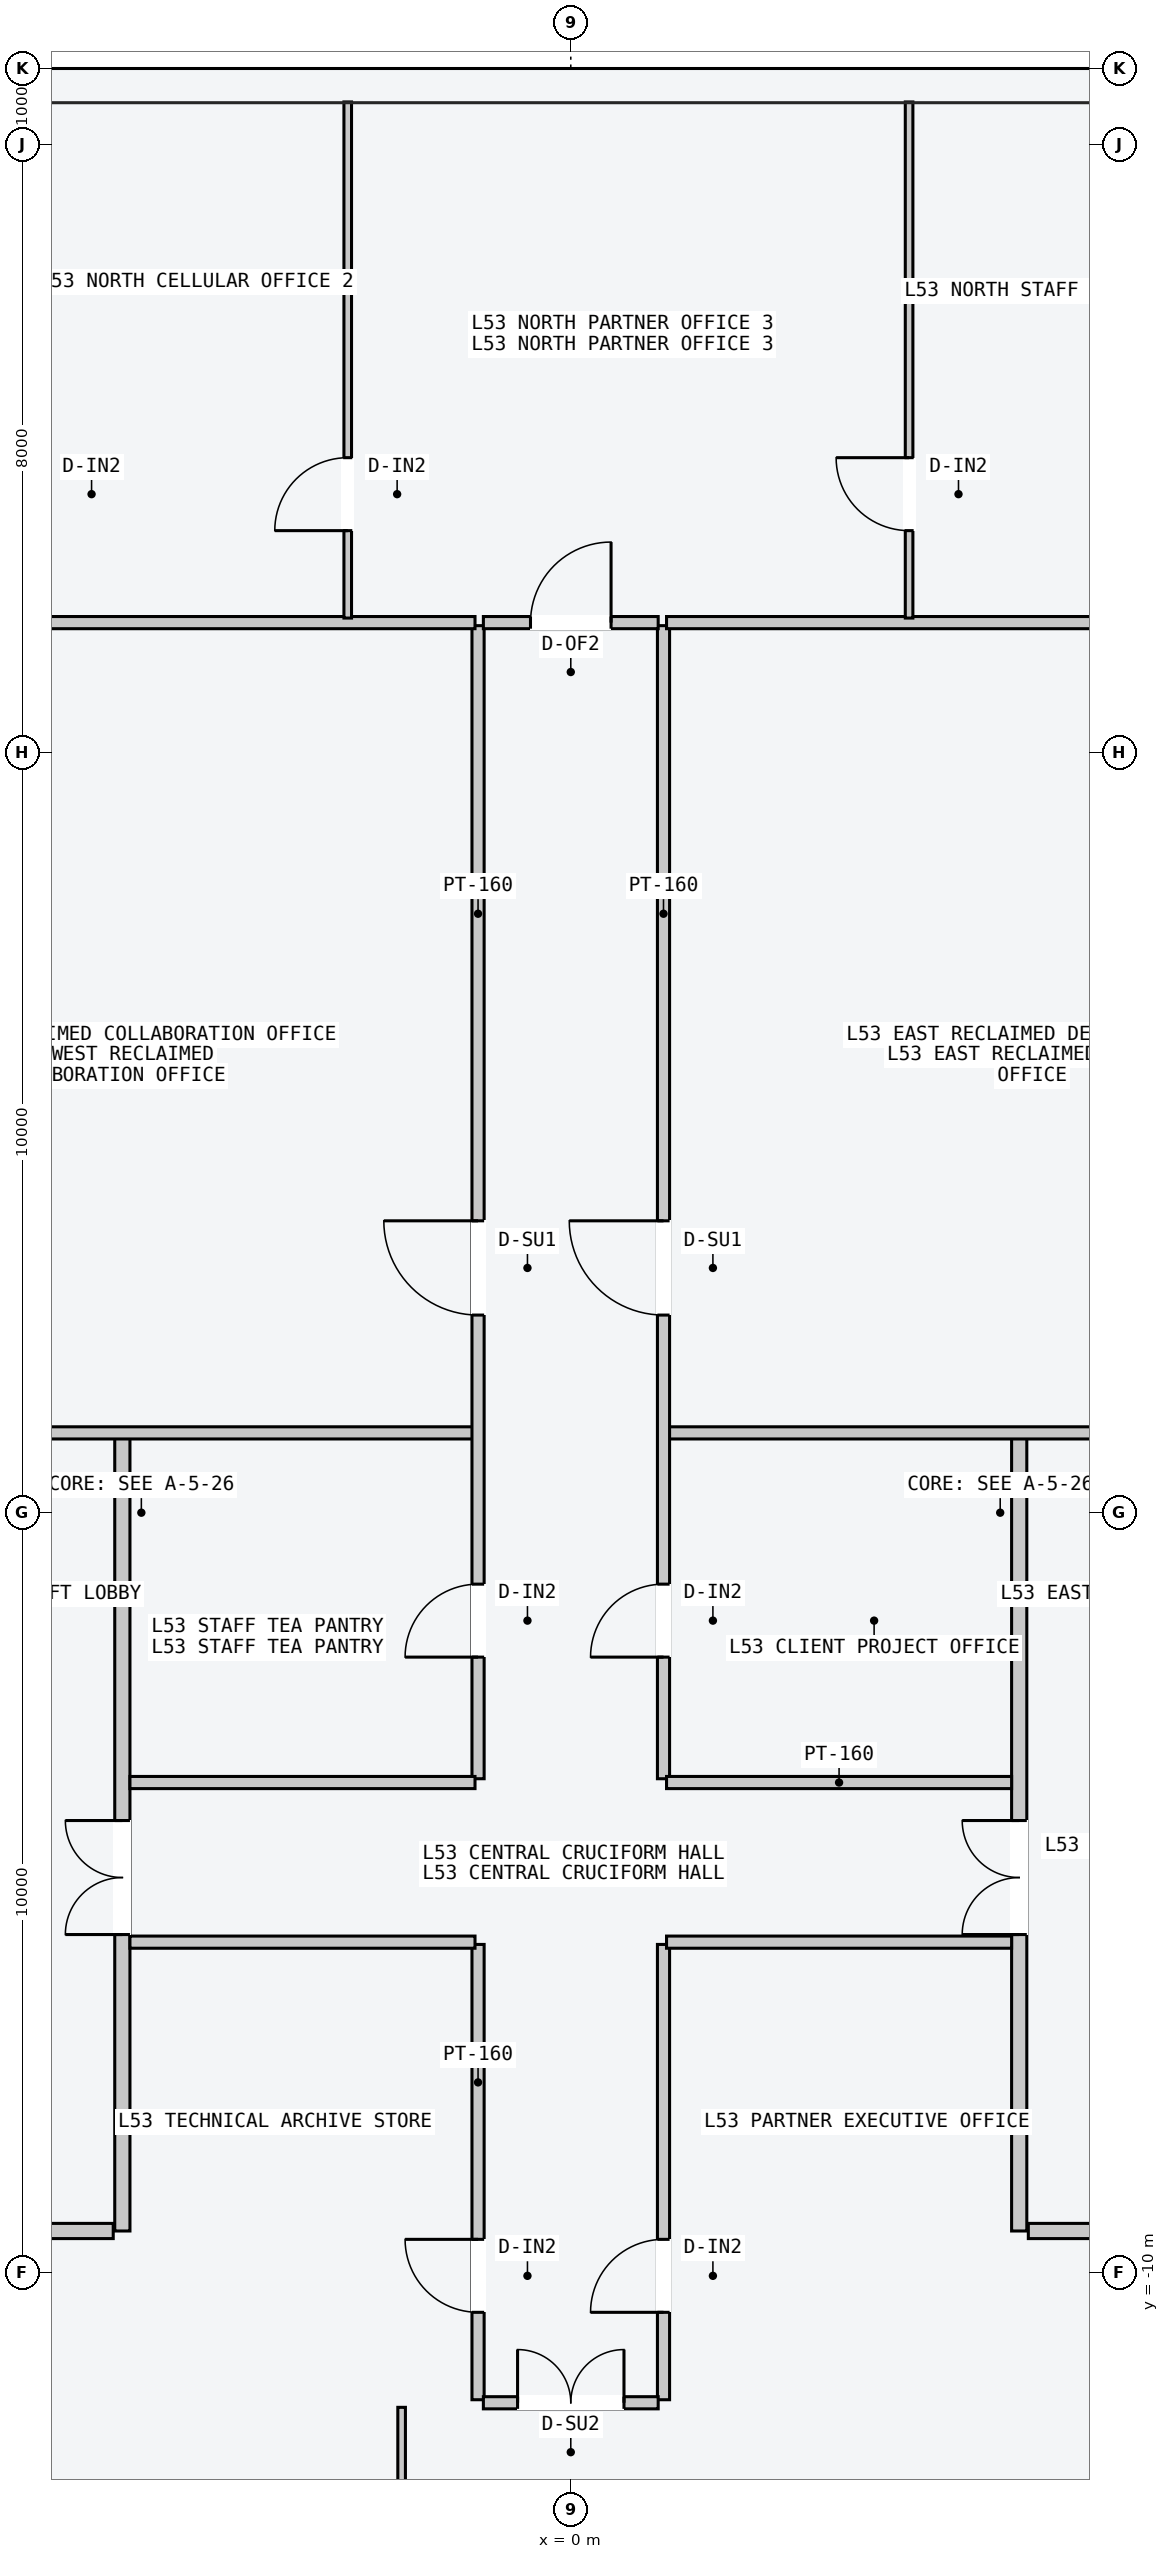
"""IFC4 building model, lengths in metres.
Left out: names, types, materials, properties, quantities, classifications, styles, units other than length and angle.
Written with IfcOpenShell. Run it as: python <this file> out.ifc"""

import sys

from ifc_helpers import new_model, si_unit, direction, frame, frame_2d, origin, place, context, subcontext, project, spatial, rectangle, extrude, element, fill, save


model = new_model("IFC4")
c1 = context("Model", 3, precision=1e-05, world=origin(), true_north=direction((0.0, 1.0)))
c2 = subcontext(c1, "Body", "Model", "MODEL_VIEW")
j1 = project(units=[si_unit("LENGTHUNIT", "METRE"), si_unit("PLANEANGLEUNIT", "RADIAN")], contexts=[c1])
p1 = place(None, origin())
s1 = spatial("IfcSite", under=j1, at=p1, CompositionType="ELEMENT")
p2 = place(p1, origin())
s2 = spatial("IfcBuilding", under=s1, at=p2, CompositionType="ELEMENT")
p3 = place(p2, frame((0.0, 0.0, 201.9)))
s3 = spatial("IfcBuildingStorey", under=s2, at=p3, CompositionType="ELEMENT", Elevation=201.9)
p4 = place(p3, frame((-5.9, -9.45, 0.0), z_axis=(0.0, 0.0, 1.0), x_axis=(0.0, 1.0, 0.0)))
e1 = element("IfcWall", 1, at=p4, inside=s3, PredefinedType="PARTITIONING", context=c2, shape_type="SweptSolid", body=[
    extrude(rectangle(XDim=10.5, YDim=0.2, at=frame_2d((5.25, 0.0))), origin(), (0.0, 0.0, 1.0), 3.4),
])
p5 = place(p4, frame((3.9, 0.0, 0.0)))
e2 = element("IfcOpeningElement", 2, at=p5, cuts=e1, PredefinedType="OPENING", context=c2, shape_type="SweptSolid", body=[
    extrude(rectangle(XDim=1.5, YDim=2.2, at=frame_2d((0.75, 1.1))), frame((0.0, 0.11, 0.0), z_axis=(0.0, -1.0, 0.0), x_axis=(1.0, 0.0, 0.0)), (0.0, 0.0, 1.0), 0.22),
])
p6 = place(p3, frame((-6.02, -9.45, 0.0), z_axis=(0.0, 0.0, 1.0), x_axis=(-1.0, 0.0, 0.0)))
e3 = element("IfcWall", 3, at=p6, inside=s3, PredefinedType="PARTITIONING", context=c2, shape_type="SweptSolid", body=[
    extrude(rectangle(XDim=1.8, YDim=0.2, at=frame_2d((0.9, 0.0))), origin(), (0.0, 0.0, 1.0), 3.4),
])
p7 = place(p3, frame((5.9, -9.45, 0.0), z_axis=(0.0, 0.0, 1.0), x_axis=(0.0, 1.0, 0.0)))
e4 = element("IfcWall", 4, at=p7, inside=s3, PredefinedType="PARTITIONING", context=c2, shape_type="SweptSolid", body=[
    extrude(rectangle(XDim=10.5, YDim=0.2, at=frame_2d((5.25, 0.0))), origin(), (0.0, 0.0, 1.0), 3.4),
])
p8 = place(p7, frame((3.9, 0.0, 0.0)))
e5 = element("IfcOpeningElement", 5, at=p8, cuts=e4, PredefinedType="OPENING", context=c2, shape_type="SweptSolid", body=[
    extrude(rectangle(XDim=1.5, YDim=2.2, at=frame_2d((0.75, 1.1))), frame((0.0, 0.11, 0.0), z_axis=(0.0, -1.0, 0.0), x_axis=(1.0, 0.0, 0.0)), (0.0, 0.0, 1.0), 0.22),
])
p9 = place(p3, frame((6.02, -9.45, 0.0), z_axis=(0.0, 0.0, 1.0), x_axis=(1.0, 0.0, 0.0)))
e6 = element("IfcWall", 6, at=p9, inside=s3, PredefinedType="PARTITIONING", context=c2, shape_type="SweptSolid", body=[
    extrude(rectangle(XDim=1.8, YDim=0.2, at=frame_2d((0.9, 0.0))), origin(), (0.0, 0.0, 1.0), 3.4),
])
p10 = place(p3, frame((-10.05, 1.05, 0.0), z_axis=(0.0, 0.0, 1.0), x_axis=(1.0, 0.0, 0.0)))
e7 = element("IfcWall", 7, at=p10, inside=s3, PredefinedType="PARTITIONING", context=c2, shape_type="SweptSolid", body=[
    extrude(rectangle(XDim=8.79, YDim=0.16, at=frame_2d((4.395, 0.0))), origin(), (0.0, 0.0, 1.0), 3.4),
])
p11 = place(p3, frame((-1.22, -3.5, 0.0), z_axis=(0.0, 0.0, 1.0), x_axis=(0.0, 1.0, 0.0)))
e8 = element("IfcWall", 8, at=p11, inside=s3, PredefinedType="PARTITIONING", context=c2, shape_type="SweptSolid", body=[
    extrude(rectangle(XDim=15.17, YDim=0.16, at=frame_2d((7.585, 0.0))), origin(), (0.0, 0.0, 1.0), 3.4),
])
p12 = place(p11, frame((6.1, 0.0, 0.0)))
e9 = element("IfcOpeningElement", 9, at=p12, cuts=e8, PredefinedType="OPENING", context=c2, shape_type="SweptSolid", body=[
    extrude(rectangle(XDim=1.24, YDim=2.24, at=frame_2d((0.62, 1.12))), frame((0.0, 0.09, 0.0), z_axis=(0.0, -1.0, 0.0), x_axis=(1.0, 0.0, 0.0)), (0.0, 0.0, 1.0), 0.18),
])
p13 = place(p11, frame((1.6, 0.0, 0.0)))
e10 = element("IfcOpeningElement", 10, at=p13, cuts=e8, PredefinedType="OPENING", context=c2, shape_type="SweptSolid", body=[
    extrude(rectangle(XDim=0.96, YDim=2.18, at=frame_2d((0.48, 1.09))), frame((0.0, 0.09, 0.0), z_axis=(0.0, -1.0, 0.0), x_axis=(1.0, 0.0, 0.0)), (0.0, 0.0, 1.0), 0.18),
])
p14 = place(p3, frame((-7.5, 11.71, 0.0), z_axis=(0.0, 0.0, 1.0), x_axis=(1.0, 0.0, 0.0)))
e11 = element("IfcWall", 11, at=p14, inside=s3, PredefinedType="PARTITIONING", context=c2, shape_type="SweptSolid", body=[
    extrude(rectangle(XDim=6.24, YDim=0.16, at=frame_2d((3.12, 0.0))), origin(), (0.0, 0.0, 1.0), 3.4),
])
p15 = place(p3, frame((-5.8, -3.55, 0.0), z_axis=(0.0, 0.0, 1.0), x_axis=(1.0, 0.0, 0.0)))
e12 = element("IfcWall", 12, at=p15, inside=s3, PredefinedType="PARTITIONING", context=c2, shape_type="SweptSolid", body=[
    extrude(rectangle(XDim=4.54, YDim=0.16, at=frame_2d((2.27, 0.0))), origin(), (0.0, 0.0, 1.0), 3.4),
])
p16 = place(p3, frame((1.26, 1.05, 0.0), z_axis=(0.0, 0.0, 1.0), x_axis=(1.0, 0.0, 0.0)))
e13 = element("IfcWall", 13, at=p16, inside=s3, PredefinedType="PARTITIONING", context=c2, shape_type="SweptSolid", body=[
    extrude(rectangle(XDim=8.8, YDim=0.16, at=frame_2d((4.4, 0.0))), origin(), (0.0, 0.0, 1.0), 3.4),
])
p17 = place(p3, frame((1.22, -3.5, 0.0), z_axis=(0.0, 0.0, 1.0), x_axis=(0.0, 1.0, 0.0)))
e14 = element("IfcWall", 14, at=p17, inside=s3, PredefinedType="PARTITIONING", context=c2, shape_type="SweptSolid", body=[
    extrude(rectangle(XDim=15.17, YDim=0.16, at=frame_2d((7.585, 0.0))), origin(), (0.0, 0.0, 1.0), 3.4),
])
p18 = place(p17, frame((6.1, 0.0, 0.0)))
e15 = element("IfcOpeningElement", 15, at=p18, cuts=e14, PredefinedType="OPENING", context=c2, shape_type="SweptSolid", body=[
    extrude(rectangle(XDim=1.24, YDim=2.24, at=frame_2d((0.62, 1.12))), frame((0.0, 0.09, 0.0), z_axis=(0.0, -1.0, 0.0), x_axis=(1.0, 0.0, 0.0)), (0.0, 0.0, 1.0), 0.18),
])
p19 = place(p17, frame((1.6, 0.0, 0.0)))
e16 = element("IfcOpeningElement", 16, at=p19, cuts=e14, PredefinedType="OPENING", context=c2, shape_type="SweptSolid", body=[
    extrude(rectangle(XDim=0.96, YDim=2.18, at=frame_2d((0.48, 1.09))), frame((0.0, 0.09, 0.0), z_axis=(0.0, -1.0, 0.0), x_axis=(1.0, 0.0, 0.0)), (0.0, 0.0, 1.0), 0.18),
])
p20 = place(p3, frame((1.26, 11.71, 0.0), z_axis=(0.0, 0.0, 1.0), x_axis=(1.0, 0.0, 0.0)))
e17 = element("IfcWall", 17, at=p20, inside=s3, PredefinedType="PARTITIONING", context=c2, shape_type="SweptSolid", body=[
    extrude(rectangle(XDim=6.24, YDim=0.16, at=frame_2d((3.12, 0.0))), origin(), (0.0, 0.0, 1.0), 3.4),
])
p21 = place(p3, frame((1.26, -3.55, 0.0), z_axis=(0.0, 0.0, 1.0), x_axis=(1.0, 0.0, 0.0)))
e18 = element("IfcWall", 18, at=p21, inside=s3, PredefinedType="PARTITIONING", context=c2, shape_type="SweptSolid", body=[
    extrude(rectangle(XDim=4.54, YDim=0.16, at=frame_2d((2.27, 0.0))), origin(), (0.0, 0.0, 1.0), 3.4),
])
p22 = place(p3, frame((-1.22, -11.67, 0.0), z_axis=(0.0, 0.0, 1.0), x_axis=(0.0, 1.0, 0.0)))
e19 = element("IfcWall", 19, at=p22, inside=s3, PredefinedType="PARTITIONING", context=c2, shape_type="SweptSolid", body=[
    extrude(rectangle(XDim=5.99, YDim=0.16, at=frame_2d((2.995, 0.0))), origin(), (0.0, 0.0, 1.0), 3.4),
])
p23 = place(p22, frame((1.15, 0.0, 0.0)))
e20 = element("IfcOpeningElement", 20, at=p23, cuts=e19, PredefinedType="OPENING", context=c2, shape_type="SweptSolid", body=[
    extrude(rectangle(XDim=0.96, YDim=2.18, at=frame_2d((0.48, 1.09))), frame((0.0, 0.09, 0.0), z_axis=(0.0, -1.0, 0.0), x_axis=(1.0, 0.0, 0.0)), (0.0, 0.0, 1.0), 0.18),
])
p24 = place(p3, frame((1.22, -11.67, 0.0), z_axis=(0.0, 0.0, 1.0), x_axis=(0.0, 1.0, 0.0)))
e21 = element("IfcWall", 21, at=p24, inside=s3, PredefinedType="PARTITIONING", context=c2, shape_type="SweptSolid", body=[
    extrude(rectangle(XDim=5.99, YDim=0.16, at=frame_2d((2.995, 0.0))), origin(), (0.0, 0.0, 1.0), 3.4),
])
p25 = place(p24, frame((1.15, 0.0, 0.0)))
e22 = element("IfcOpeningElement", 22, at=p25, cuts=e21, PredefinedType="OPENING", context=c2, shape_type="SweptSolid", body=[
    extrude(rectangle(XDim=0.96, YDim=2.18, at=frame_2d((0.48, 1.09))), frame((0.0, 0.09, 0.0), z_axis=(0.0, -1.0, 0.0), x_axis=(1.0, 0.0, 0.0)), (0.0, 0.0, 1.0), 0.18),
])
for number, where, z_axis, x_axis in (
    (23, (-5.8, -5.65, 0.0), (0.0, 0.0, 1.0), (1.0, 0.0, 0.0)),
    (24, (1.26, -5.65, 0.0), (0.0, 0.0, 1.0), (1.0, 0.0, 0.0)),
):
    element("IfcWall", number, at=place(p3, frame(where, z_axis=z_axis, x_axis=x_axis)), inside=s3, PredefinedType="PARTITIONING", context=c2, shape_type="SweptSolid", body=[
        extrude(rectangle(XDim=4.54, YDim=0.16, at=frame_2d((2.27, 0.0))), origin(), (0.0, 0.0, 1.0), 3.4),
    ])
p26 = place(p3, frame((-2.935, 11.77, 0.0), z_axis=(0.0, 0.0, 1.0), x_axis=(0.0, 1.0, 0.0)))
e25 = element("IfcWall", 25, at=p26, inside=s3, PredefinedType="PARTITIONING", context=c2, shape_type="SweptSolid", body=[
    extrude(rectangle(XDim=6.79, YDim=0.1, at=frame_2d((3.395, 0.0))), origin(), (0.0, 0.0, 1.0), 3.4),
])
p27 = place(p26, frame((1.15, 0.0, 0.0)))
e26 = element("IfcOpeningElement", 26, at=p27, cuts=e25, PredefinedType="OPENING", context=c2, shape_type="SweptSolid", body=[
    extrude(rectangle(XDim=0.96, YDim=2.18, at=frame_2d((0.48, 1.09))), frame((0.0, 0.06, 0.0), z_axis=(0.0, -1.0, 0.0), x_axis=(1.0, 0.0, 0.0)), (0.0, 0.0, 1.0), 0.12),
])
p28 = place(p3, frame((4.451, 11.77, 0.0), z_axis=(0.0, 0.0, 1.0), x_axis=(0.0, 1.0, 0.0)))
e27 = element("IfcWall", 27, at=p28, inside=s3, PredefinedType="PARTITIONING", context=c2, shape_type="SweptSolid", body=[
    extrude(rectangle(XDim=6.79, YDim=0.1, at=frame_2d((3.395, 0.0))), origin(), (0.0, 0.0, 1.0), 3.4),
])
p29 = place(p28, frame((1.15, 0.0, 0.0)))
e28 = element("IfcOpeningElement", 28, at=p29, cuts=e27, PredefinedType="OPENING", context=c2, shape_type="SweptSolid", body=[
    extrude(rectangle(XDim=0.96, YDim=2.18, at=frame_2d((0.48, 1.09))), frame((0.0, 0.06, 0.0), z_axis=(0.0, -1.0, 0.0), x_axis=(1.0, 0.0, 0.0)), (0.0, 0.0, 1.0), 0.12),
])
p30 = place(p3, frame((-1.15, 11.71, 0.0), z_axis=(0.0, 0.0, 1.0), x_axis=(1.0, 0.0, 0.0)))
e29 = element("IfcWall", 29, at=p30, inside=s3, PredefinedType="PARTITIONING", context=c2, shape_type="SweptSolid", body=[
    extrude(rectangle(XDim=2.3, YDim=0.16, at=frame_2d((1.15, 0.0))), origin(), (0.0, 0.0, 1.0), 3.4),
])
p31 = place(p30, frame((0.62, 0.0, 0.0)))
e30 = element("IfcOpeningElement", 30, at=p31, cuts=e29, PredefinedType="OPENING", context=c2, shape_type="SweptSolid", body=[
    extrude(rectangle(XDim=1.06, YDim=2.2, at=frame_2d((0.53, 1.1))), frame((0.0, 0.09, 0.0), z_axis=(0.0, -1.0, 0.0), x_axis=(1.0, 0.0, 0.0)), (0.0, 0.0, 1.0), 0.18),
])
p32 = place(p3, frame((-2.226, -18.56, 0.0), z_axis=(0.0, 0.0, 1.0), x_axis=(0.0, 1.0, 0.0)))
e31 = element("IfcWall", 31, at=p32, inside=s3, PredefinedType="PARTITIONING", context=c2, shape_type="SweptSolid", body=[
    extrude(rectangle(XDim=6.79, YDim=0.1, at=frame_2d((3.395, 0.0))), origin(), (0.0, 0.0, 1.0), 3.4),
])
p33 = place(p32, frame((1.05, 0.0, 0.0)))
e32 = element("IfcOpeningElement", 32, at=p33, cuts=e31, PredefinedType="OPENING", context=c2, shape_type="SweptSolid", body=[
    extrude(rectangle(XDim=0.96, YDim=2.18, at=frame_2d((0.48, 1.09))), frame((0.0, 0.06, 0.0), z_axis=(0.0, -1.0, 0.0), x_axis=(1.0, 0.0, 0.0)), (0.0, 0.0, 1.0), 0.12),
])
p34 = place(p3, frame((-1.15, -11.71, 0.0), z_axis=(0.0, 0.0, 1.0), x_axis=(1.0, 0.0, 0.0)))
e33 = element("IfcWall", 33, at=p34, inside=s3, PredefinedType="PARTITIONING", context=c2, shape_type="SweptSolid", body=[
    extrude(rectangle(XDim=2.3, YDim=0.16, at=frame_2d((1.15, 0.0))), origin(), (0.0, 0.0, 1.0), 3.4),
])
p35 = place(p34, frame((0.45, 0.0, 0.0)))
e34 = element("IfcOpeningElement", 34, at=p35, cuts=e33, PredefinedType="OPENING", context=c2, shape_type="SweptSolid", body=[
    extrude(rectangle(XDim=1.4, YDim=2.2, at=frame_2d((0.7, 1.1))), frame((0.0, 0.09, 0.0), z_axis=(0.0, -1.0, 0.0), x_axis=(1.0, 0.0, 0.0)), (0.0, 0.0, 1.0), 0.18),
])
p36 = place(p5, origin())
e35 = element("IfcDoor", 35, at=p36, inside=s3, OperationType="DOUBLE_DOOR_SINGLE_SWING", PredefinedType="DOOR", context=c2, shape_type="SweptSolid", body=[
    extrude(rectangle(XDim=1.5, YDim=2.2, at=frame_2d((0.75, 1.1))), frame((0.0, 0.025, 0.0), z_axis=(0.0, -1.0, 0.0), x_axis=(1.0, 0.0, 0.0)), (0.0, 0.0, 1.0), 0.05),
])
fill(e2, e35)
p37 = place(p8, origin())
e36 = element("IfcDoor", 36, at=p37, inside=s3, OperationType="DOUBLE_DOOR_SINGLE_SWING", PredefinedType="DOOR", context=c2, shape_type="SweptSolid", body=[
    extrude(rectangle(XDim=1.5, YDim=2.2, at=frame_2d((0.75, 1.1))), frame((0.0, 0.025, 0.0), z_axis=(0.0, -1.0, 0.0), x_axis=(1.0, 0.0, 0.0)), (0.0, 0.0, 1.0), 0.05),
])
fill(e5, e36)
p38 = place(p12, origin())
e37 = element("IfcDoor", 37, at=p38, inside=s3, OperationType="SINGLE_SWING_RIGHT", PredefinedType="DOOR", context=c2, shape_type="SweptSolid", body=[
    extrude(rectangle(XDim=1.24, YDim=2.24, at=frame_2d((0.62, 1.12))), frame((0.0, 0.025, 0.0), z_axis=(0.0, -1.0, 0.0), x_axis=(1.0, 0.0, 0.0)), (0.0, 0.0, 1.0), 0.05),
])
fill(e9, e37)
p39 = place(p13, origin())
e38 = element("IfcDoor", 38, at=p39, inside=s3, OperationType="SINGLE_SWING_LEFT", PredefinedType="DOOR", context=c2, shape_type="SweptSolid", body=[
    extrude(rectangle(XDim=0.96, YDim=2.18, at=frame_2d((0.48, 1.09))), frame((0.0, 0.025, 0.0), z_axis=(0.0, -1.0, 0.0), x_axis=(1.0, 0.0, 0.0)), (0.0, 0.0, 1.0), 0.05),
])
fill(e10, e38)
p40 = place(p18, origin())
e39 = element("IfcDoor", 39, at=p40, inside=s3, OperationType="SINGLE_SWING_RIGHT", PredefinedType="DOOR", context=c2, shape_type="SweptSolid", body=[
    extrude(rectangle(XDim=1.24, YDim=2.24, at=frame_2d((0.62, 1.12))), frame((0.0, 0.025, 0.0), z_axis=(0.0, -1.0, 0.0), x_axis=(1.0, 0.0, 0.0)), (0.0, 0.0, 1.0), 0.05),
])
fill(e15, e39)
p41 = place(p19, origin())
e40 = element("IfcDoor", 40, at=p41, inside=s3, OperationType="SINGLE_SWING_LEFT", PredefinedType="DOOR", context=c2, shape_type="SweptSolid", body=[
    extrude(rectangle(XDim=0.96, YDim=2.18, at=frame_2d((0.48, 1.09))), frame((0.0, 0.025, 0.0), z_axis=(0.0, -1.0, 0.0), x_axis=(1.0, 0.0, 0.0)), (0.0, 0.0, 1.0), 0.05),
])
fill(e16, e40)
p42 = place(p23, origin())
e41 = element("IfcDoor", 41, at=p42, inside=s3, OperationType="SINGLE_SWING_RIGHT", PredefinedType="DOOR", context=c2, shape_type="SweptSolid", body=[
    extrude(rectangle(XDim=0.96, YDim=2.18, at=frame_2d((0.48, 1.09))), frame((0.0, 0.025, 0.0), z_axis=(0.0, -1.0, 0.0), x_axis=(1.0, 0.0, 0.0)), (0.0, 0.0, 1.0), 0.05),
])
fill(e20, e41)
p43 = place(p25, origin())
e42 = element("IfcDoor", 42, at=p43, inside=s3, OperationType="SINGLE_SWING_LEFT", PredefinedType="DOOR", context=c2, shape_type="SweptSolid", body=[
    extrude(rectangle(XDim=0.96, YDim=2.18, at=frame_2d((0.48, 1.09))), frame((0.0, 0.025, 0.0), z_axis=(0.0, -1.0, 0.0), x_axis=(1.0, 0.0, 0.0)), (0.0, 0.0, 1.0), 0.05),
])
fill(e22, e42)
p44 = place(p27, origin())
e43 = element("IfcDoor", 43, at=p44, inside=s3, OperationType="SINGLE_SWING_LEFT", PredefinedType="DOOR", context=c2, shape_type="SweptSolid", body=[
    extrude(rectangle(XDim=0.96, YDim=2.18, at=frame_2d((0.48, 1.09))), frame((0.0, 0.025, 0.0), z_axis=(0.0, -1.0, 0.0), x_axis=(1.0, 0.0, 0.0)), (0.0, 0.0, 1.0), 0.05),
])
fill(e26, e43)
p45 = place(p29, origin())
e44 = element("IfcDoor", 44, at=p45, inside=s3, OperationType="SINGLE_SWING_RIGHT", PredefinedType="DOOR", context=c2, shape_type="SweptSolid", body=[
    extrude(rectangle(XDim=0.96, YDim=2.18, at=frame_2d((0.48, 1.09))), frame((0.0, 0.025, 0.0), z_axis=(0.0, -1.0, 0.0), x_axis=(1.0, 0.0, 0.0)), (0.0, 0.0, 1.0), 0.05),
])
fill(e28, e44)
p46 = place(p31, origin())
e45 = element("IfcDoor", 45, at=p46, inside=s3, OperationType="SINGLE_SWING_RIGHT", PredefinedType="DOOR", context=c2, shape_type="SweptSolid", body=[
    extrude(rectangle(XDim=1.06, YDim=2.2, at=frame_2d((0.53, 1.1))), frame((0.0, 0.025, 0.0), z_axis=(0.0, -1.0, 0.0), x_axis=(1.0, 0.0, 0.0)), (0.0, 0.0, 1.0), 0.05),
])
fill(e30, e45)
p47 = place(p35, origin())
e46 = element("IfcDoor", 46, at=p47, inside=s3, OperationType="DOUBLE_DOOR_SINGLE_SWING", PredefinedType="DOOR", context=c2, shape_type="SweptSolid", body=[
    extrude(rectangle(XDim=1.4, YDim=2.2, at=frame_2d((0.7, 1.1))), frame((0.0, 0.025, 0.0), z_axis=(0.0, -1.0, 0.0), x_axis=(1.0, 0.0, 0.0)), (0.0, 0.0, 1.0), 0.05),
])
fill(e34, e46)
save(model, sys.argv[1])
